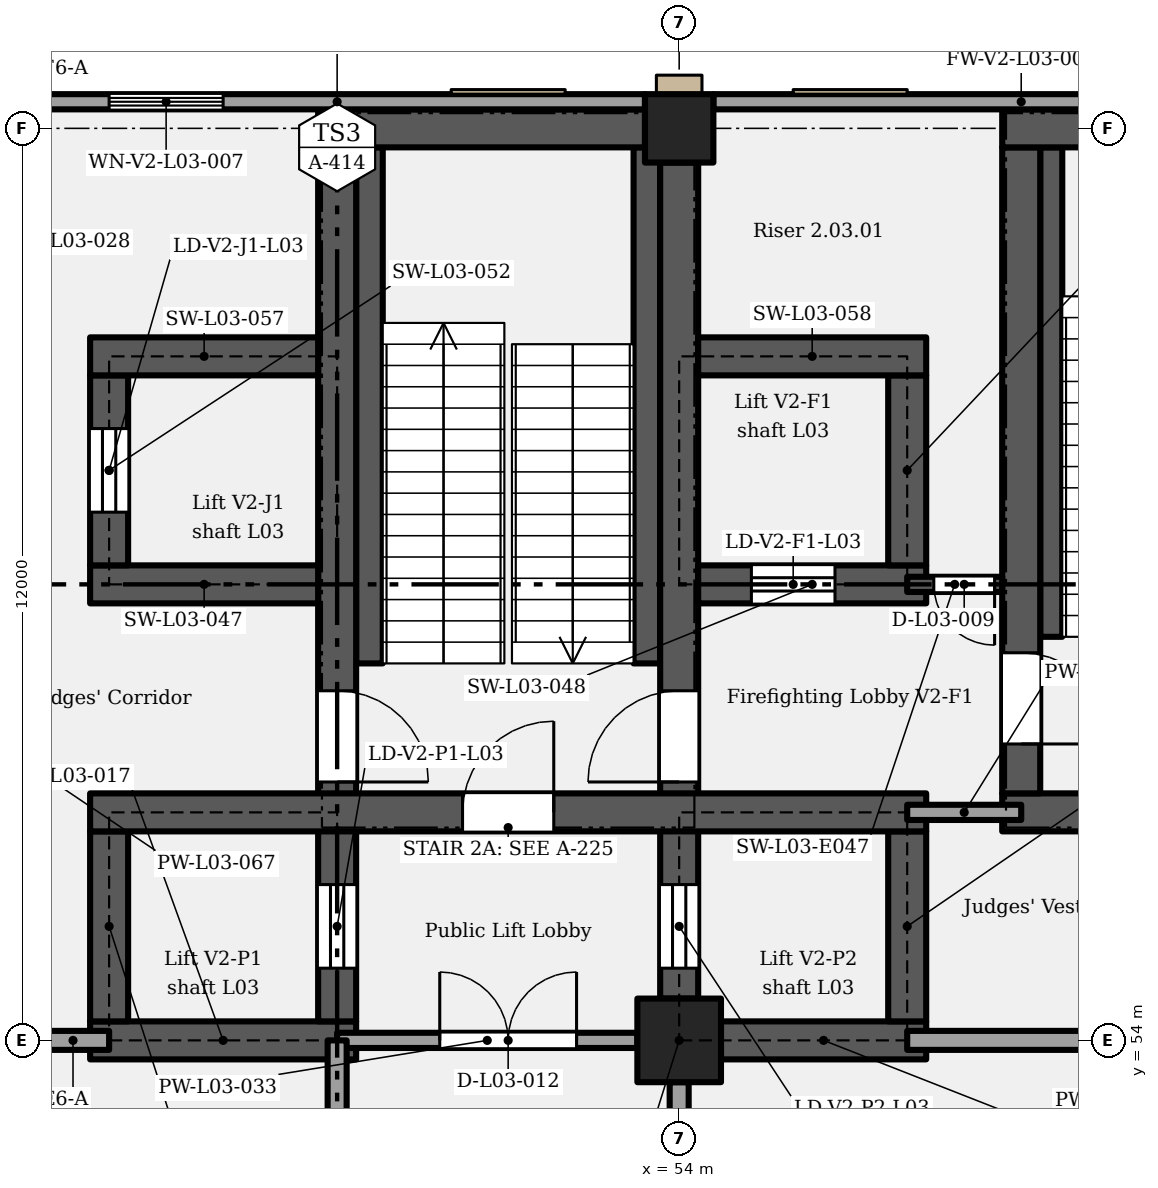
"""IFC4 building model, lengths in metres.
Left out: names, types, materials, properties, quantities, classifications, styles, units other than length and angle.
Written with IfcOpenShell. Run it as: python <this file> out.ifc"""

import sys

from ifc_helpers import new_model, si_unit, direction, frame, frame_2d, origin, origin_2d, place, context, subcontext, project, spatial, rectangle, extrude, element, fill, save


model = new_model("IFC4")
c1 = context("Model", 3, precision=1e-05, world=origin(), true_north=direction((0.0, 1.0)))
c2 = subcontext(c1, "Body", "Model", "MODEL_VIEW")
j1 = project(units=[si_unit("LENGTHUNIT", "METRE"), si_unit("PLANEANGLEUNIT", "RADIAN")], contexts=[c1])
p1 = place(None, origin())
s1 = spatial("IfcSite", under=j1, at=p1, CompositionType="ELEMENT")
p2 = place(p1, origin())
s2 = spatial("IfcBuilding", under=s1, at=p2, CompositionType="ELEMENT")
p3 = place(p2, frame((0.0, 0.0, 17.4)))
s3 = spatial("IfcBuildingStorey", under=s2, at=p3, CompositionType="ELEMENT", Elevation=17.4)
p4 = place(p3, frame((54.0, 54.0, 0.0), z_axis=(0.0, 0.0, 1.0), x_axis=(1.0, 0.0, 0.0)))
e1 = element("IfcColumn", 1, at=p4, inside=s3, PredefinedType="COLUMN", context=c2, shape_type="SweptSolid", body=[
    extrude(rectangle(XDim=1.1, YDim=1.1, at=origin_2d()), origin(), (0.0, 0.0, 1.0), 5.4),
])
p5 = place(p3, frame((54.0, 66.0, 0.0), z_axis=(0.0, 0.0, 1.0), x_axis=(1.0, 0.0, 0.0)))
e2 = element("IfcColumn", 2, at=p5, inside=s3, PredefinedType="COLUMN", context=c2, shape_type="SweptSolid", body=[
    extrude(rectangle(XDim=0.9, YDim=0.9, at=origin_2d()), origin(), (0.0, 0.0, 1.0), 5.4),
])
p6 = place(p3, frame((46.25, 54.0, 0.0), z_axis=(0.0, 0.0, 1.0), x_axis=(1.0, 0.0, 0.0)))
e3 = element("IfcWall", 3, at=p6, inside=s3, PredefinedType="SHEAR", context=c2, shape_type="SweptSolid", body=[
    extrude(rectangle(XDim=3.5, YDim=0.5, at=frame_2d((1.75, 0.0))), origin(), (0.0, 0.0, 1.0), 5.15),
])
p7 = place(p3, frame((54.55, 54.0, 0.0), z_axis=(0.0, 0.0, 1.0), x_axis=(1.0, 0.0, 0.0)))
e4 = element("IfcWall", 4, at=p7, inside=s3, PredefinedType="SHEAR", context=c2, shape_type="SweptSolid", body=[
    extrude(rectangle(XDim=2.7, YDim=0.5, at=frame_2d((1.35, 0.0))), origin(), (0.0, 0.0, 1.0), 5.15),
])
p8 = place(p3, frame((46.5, 54.25, 0.0), z_axis=(0.0, 0.0, 1.0), x_axis=(0.0, 1.0, 0.0)))
e5 = element("IfcWall", 5, at=p8, inside=s3, PredefinedType="SHEAR", context=c2, shape_type="SweptSolid", body=[
    extrude(rectangle(XDim=2.5, YDim=0.5, at=frame_2d((1.25, 0.0))), origin(), (0.0, 0.0, 1.0), 5.15),
])
p9 = place(p3, frame((49.5, 54.25, 0.0), z_axis=(0.0, 0.0, 1.0), x_axis=(0.0, 1.0, 0.0)))
e6 = element("IfcWall", 6, at=p9, inside=s3, PredefinedType="SHEAR", context=c2, shape_type="SweptSolid", body=[
    extrude(rectangle(XDim=11.5, YDim=0.5, at=frame_2d((5.75, 0.0))), origin(), (0.0, 0.0, 1.0), 5.15),
])
p10 = place(p9, frame((0.7, 0.0, 0.0)))
e7 = element("IfcOpeningElement", 7, at=p10, cuts=e6, PredefinedType="OPENING", context=c2, shape_type="SweptSolid", body=[
    extrude(rectangle(XDim=1.1, YDim=2.1, at=frame_2d((0.55, 1.05))), frame((0.0, 0.26, 0.0), z_axis=(0.0, -1.0, 0.0), x_axis=(1.0, 0.0, 0.0)), (0.0, 0.0, 1.0), 0.52),
])
p11 = place(p9, frame((4.35, 0.0, 0.0), z_axis=(0.0, 0.0, 1.0), x_axis=(-1.0, 0.0, 0.0)))
e8 = element("IfcOpeningElement", 8, at=p11, cuts=e6, PredefinedType="OPENING", context=c2, shape_type="SweptSolid", body=[
    extrude(rectangle(XDim=1.2, YDim=2.1, at=frame_2d((0.6, 1.05))), frame((0.0, 0.26, 0.0), z_axis=(0.0, -1.0, 0.0), x_axis=(1.0, 0.0, 0.0)), (0.0, 0.0, 1.0), 0.52),
])
p12 = place(p3, frame((57.0, 54.25, 0.0), z_axis=(0.0, 0.0, 1.0), x_axis=(0.0, 1.0, 0.0)))
e9 = element("IfcWall", 9, at=p12, inside=s3, PredefinedType="SHEAR", context=c2, shape_type="SweptSolid", body=[
    extrude(rectangle(XDim=2.5, YDim=0.5, at=frame_2d((1.25, 0.0))), origin(), (0.0, 0.0, 1.0), 5.15),
])
p13 = place(p3, frame((54.0, 54.55, 0.0), z_axis=(0.0, 0.0, 1.0), x_axis=(0.0, 1.0, 0.0)))
e10 = element("IfcWall", 10, at=p13, inside=s3, PredefinedType="SHEAR", context=c2, shape_type="SweptSolid", body=[
    extrude(rectangle(XDim=11.0, YDim=0.5, at=frame_2d((5.5, 0.0))), origin(), (0.0, 0.0, 1.0), 5.15),
])
p14 = place(p13, frame((0.4, 0.0, 0.0)))
e11 = element("IfcOpeningElement", 11, at=p14, cuts=e10, PredefinedType="OPENING", context=c2, shape_type="SweptSolid", body=[
    extrude(rectangle(XDim=1.1, YDim=2.1, at=frame_2d((0.55, 1.05))), frame((0.0, 0.26, 0.0), z_axis=(0.0, -1.0, 0.0), x_axis=(1.0, 0.0, 0.0)), (0.0, 0.0, 1.0), 0.52),
])
p15 = place(p13, frame((2.85, 0.0, 0.0)))
e12 = element("IfcOpeningElement", 12, at=p15, cuts=e10, PredefinedType="OPENING", context=c2, shape_type="SweptSolid", body=[
    extrude(rectangle(XDim=1.2, YDim=2.1, at=frame_2d((0.6, 1.05))), frame((0.0, 0.26, 0.0), z_axis=(0.0, -1.0, 0.0), x_axis=(1.0, 0.0, 0.0)), (0.0, 0.0, 1.0), 0.52),
])
p16 = place(p3, frame((46.25, 57.0, 0.0), z_axis=(0.0, 0.0, 1.0), x_axis=(1.0, 0.0, 0.0)))
e13 = element("IfcWall", 13, at=p16, inside=s3, PredefinedType="SHEAR", context=c2, shape_type="SweptSolid", body=[
    extrude(rectangle(XDim=11.0, YDim=0.5, at=frame_2d((5.5, 0.0))), origin(), (0.0, 0.0, 1.0), 5.15),
])
p17 = place(p16, frame((4.9, 0.0, 0.0)))
e14 = element("IfcOpeningElement", 14, at=p17, cuts=e13, PredefinedType="OPENING", context=c2, shape_type="SweptSolid", body=[
    extrude(rectangle(XDim=1.2, YDim=2.1, at=frame_2d((0.6, 1.05))), frame((0.0, 0.26, 0.0), z_axis=(0.0, -1.0, 0.0), x_axis=(1.0, 0.0, 0.0)), (0.0, 0.0, 1.0), 0.52),
])
p18 = place(p3, frame((58.25, 57.0, 0.0), z_axis=(0.0, 0.0, 1.0), x_axis=(1.0, 0.0, 0.0)))
e15 = element("IfcWall", 15, at=p18, inside=s3, PredefinedType="SHEAR", context=c2, shape_type="SweptSolid", body=[
    extrude(rectangle(XDim=5.0, YDim=0.5, at=frame_2d((2.5, 0.0))), origin(), (0.0, 0.0, 1.0), 5.15),
])
p19 = place(p18, frame((2.0, 0.0, 0.0)))
e16 = element("IfcOpeningElement", 16, at=p19, cuts=e15, PredefinedType="OPENING", context=c2, shape_type="SweptSolid", body=[
    extrude(rectangle(XDim=1.0, YDim=2.1, at=frame_2d((0.5, 1.05))), frame((0.0, 0.26, 0.0), z_axis=(0.0, -1.0, 0.0), x_axis=(1.0, 0.0, 0.0)), (0.0, 0.0, 1.0), 0.52),
])
p20 = place(p3, frame((58.5, 57.25, 0.0), z_axis=(0.0, 0.0, 1.0), x_axis=(0.0, 1.0, 0.0)))
e17 = element("IfcWall", 17, at=p20, inside=s3, PredefinedType="SHEAR", context=c2, shape_type="SweptSolid", body=[
    extrude(rectangle(XDim=8.5, YDim=0.5, at=frame_2d((4.25, 0.0))), origin(), (0.0, 0.0, 1.0), 5.15),
])
p21 = place(p20, frame((1.85, 0.0, 0.0), z_axis=(0.0, 0.0, 1.0), x_axis=(-1.0, 0.0, 0.0)))
e18 = element("IfcOpeningElement", 18, at=p21, cuts=e17, PredefinedType="OPENING", context=c2, shape_type="SweptSolid", body=[
    extrude(rectangle(XDim=1.2, YDim=2.1, at=frame_2d((0.6, 1.05))), frame((0.0, 0.26, 0.0), z_axis=(0.0, -1.0, 0.0), x_axis=(1.0, 0.0, 0.0)), (0.0, 0.0, 1.0), 0.52),
])
p22 = place(p3, frame((46.25, 60.0, 0.0), z_axis=(0.0, 0.0, 1.0), x_axis=(1.0, 0.0, 0.0)))
e19 = element("IfcWall", 19, at=p22, inside=s3, PredefinedType="SHEAR", context=c2, shape_type="SweptSolid", body=[
    extrude(rectangle(XDim=3.0, YDim=0.5, at=frame_2d((1.5, 0.0))), origin(), (0.0, 0.0, 1.0), 5.15),
])
p23 = place(p3, frame((54.25, 60.0, 0.0), z_axis=(0.0, 0.0, 1.0), x_axis=(1.0, 0.0, 0.0)))
e20 = element("IfcWall", 20, at=p23, inside=s3, PredefinedType="SHEAR", context=c2, shape_type="SweptSolid", body=[
    extrude(rectangle(XDim=3.0, YDim=0.5, at=frame_2d((1.5, 0.0))), origin(), (0.0, 0.0, 1.0), 5.15),
])
p24 = place(p23, frame((0.7, 0.0, 0.0)))
e21 = element("IfcOpeningElement", 21, at=p24, cuts=e20, PredefinedType="OPENING", context=c2, shape_type="SweptSolid", body=[
    extrude(rectangle(XDim=1.1, YDim=2.1, at=frame_2d((0.55, 1.05))), frame((0.0, 0.26, 0.0), z_axis=(0.0, -1.0, 0.0), x_axis=(1.0, 0.0, 0.0)), (0.0, 0.0, 1.0), 0.52),
])
p25 = place(p3, frame((46.5, 60.25, 0.0), z_axis=(0.0, 0.0, 1.0), x_axis=(0.0, 1.0, 0.0)))
e22 = element("IfcWall", 22, at=p25, inside=s3, PredefinedType="SHEAR", context=c2, shape_type="SweptSolid", body=[
    extrude(rectangle(XDim=2.5, YDim=0.5, at=frame_2d((1.25, 0.0))), origin(), (0.0, 0.0, 1.0), 5.15),
])
p26 = place(p25, frame((0.7, 0.0, 0.0)))
e23 = element("IfcOpeningElement", 23, at=p26, cuts=e22, PredefinedType="OPENING", context=c2, shape_type="SweptSolid", body=[
    extrude(rectangle(XDim=1.1, YDim=2.1, at=frame_2d((0.55, 1.05))), frame((0.0, 0.26, 0.0), z_axis=(0.0, -1.0, 0.0), x_axis=(1.0, 0.0, 0.0)), (0.0, 0.0, 1.0), 0.52),
])
p27 = place(p3, frame((57.0, 60.25, 0.0), z_axis=(0.0, 0.0, 1.0), x_axis=(0.0, 1.0, 0.0)))
e24 = element("IfcWall", 24, at=p27, inside=s3, PredefinedType="SHEAR", context=c2, shape_type="SweptSolid", body=[
    extrude(rectangle(XDim=2.5, YDim=0.5, at=frame_2d((1.25, 0.0))), origin(), (0.0, 0.0, 1.0), 5.15),
])
for number, where, z_axis, x_axis in (
    (25, (46.25, 63.0, 0.0), (0.0, 0.0, 1.0), (1.0, 0.0, 0.0)),
    (26, (54.25, 63.0, 0.0), (0.0, 0.0, 1.0), (1.0, 0.0, 0.0)),
):
    element("IfcWall", number, at=place(p3, frame(where, z_axis=z_axis, x_axis=x_axis)), inside=s3, PredefinedType="SHEAR", context=c2, shape_type="SweptSolid", body=[
        extrude(rectangle(XDim=3.0, YDim=0.5, at=frame_2d((1.5, 0.0))), origin(), (0.0, 0.0, 1.0), 5.15),
    ])
for number, where, z_axis, x_axis in (
    (27, (49.25, 66.0, 0.0), (0.0, 0.0, 1.0), (1.0, 0.0, 0.0)),
    (28, (58.25, 66.0, 0.0), (0.0, 0.0, 1.0), (1.0, 0.0, 0.0)),
):
    element("IfcWall", number, at=place(p3, frame(where, z_axis=z_axis, x_axis=x_axis)), inside=s3, PredefinedType="SHEAR", context=c2, shape_type="SweptSolid", body=[
        extrude(rectangle(XDim=4.3, YDim=0.5, at=frame_2d((2.15, 0.0))), origin(), (0.0, 0.0, 1.0), 5.15),
    ])
p28 = place(p3, frame((45.45, 66.35, 0.0), z_axis=(0.0, 0.0, 1.0), x_axis=(1.0, 0.0, 0.0)))
e29 = element("IfcWall", 29, at=p28, inside=s3, PredefinedType="SOLIDWALL", context=c2, shape_type="SweptSolid", body=[
    extrude(rectangle(XDim=8.1, YDim=0.2, at=frame_2d((4.05, 0.0))), origin(), (0.0, 0.0, 1.0), 5.15),
])
p29 = place(p28, frame((1.05, 0.0, 1.05)))
e30 = element("IfcOpeningElement", 30, at=p29, cuts=e29, PredefinedType="OPENING", context=c2, shape_type="SweptSolid", body=[
    extrude(rectangle(XDim=1.5, YDim=3.5, at=frame_2d((0.75, 1.75))), frame((0.0, 0.11, 0.0), z_axis=(0.0, -1.0, 0.0), x_axis=(1.0, 0.0, 0.0)), (0.0, 0.0, 1.0), 0.22),
])
p30 = place(p3, frame((54.45, 66.35, 0.0), z_axis=(0.0, 0.0, 1.0), x_axis=(1.0, 0.0, 0.0)))
e31 = element("IfcWall", 31, at=p30, inside=s3, PredefinedType="SOLIDWALL", context=c2, shape_type="SweptSolid", body=[
    extrude(rectangle(XDim=8.1, YDim=0.2, at=frame_2d((4.05, 0.0))), origin(), (0.0, 0.0, 1.0), 5.15),
])
p31 = place(p3, frame((45.55, 54.0, 0.0), z_axis=(0.0, 0.0, 1.0), x_axis=(1.0, 0.0, 0.0)))
e32 = element("IfcWall", 32, at=p31, inside=s3, PredefinedType="PARTITIONING", context=c2, shape_type="SweptSolid", body=[
    extrude(rectangle(XDim=0.95, YDim=0.25, at=frame_2d((0.475, 0.0))), origin(), (0.0, 0.0, 1.0), 4.4),
])
p32 = place(p3, frame((49.5, 54.0, 0.0), z_axis=(0.0, 0.0, 1.0), x_axis=(1.0, 0.0, 0.0)))
e33 = element("IfcWall", 33, at=p32, inside=s3, PredefinedType="PARTITIONING", context=c2, shape_type="SweptSolid", body=[
    extrude(rectangle(XDim=3.95, YDim=0.2, at=frame_2d((1.975, 0.0))), origin(), (0.0, 0.0, 1.0), 4.4),
])
p33 = place(p32, frame((1.35, 0.0, 0.0)))
e34 = element("IfcOpeningElement", 34, at=p33, cuts=e33, PredefinedType="OPENING", context=c2, shape_type="SweptSolid", body=[
    extrude(rectangle(XDim=1.8, YDim=2.1, at=frame_2d((0.9, 1.05))), frame((0.0, 0.11, 0.0), z_axis=(0.0, -1.0, 0.0), x_axis=(1.0, 0.0, 0.0)), (0.0, 0.0, 1.0), 0.22),
])
p34 = place(p3, frame((57.0, 54.0, 0.0), z_axis=(0.0, 0.0, 1.0), x_axis=(1.0, 0.0, 0.0)))
e35 = element("IfcWall", 35, at=p34, inside=s3, PredefinedType="PARTITIONING", context=c2, shape_type="SweptSolid", body=[
    extrude(rectangle(XDim=5.45, YDim=0.25, at=frame_2d((2.725, 0.0))), origin(), (0.0, 0.0, 1.0), 4.4),
])
p35 = place(p34, frame((2.5, 0.0, 0.0)))
e36 = element("IfcOpeningElement", 36, at=p35, cuts=e35, PredefinedType="OPENING", context=c2, shape_type="SweptSolid", body=[
    extrude(rectangle(XDim=1.0, YDim=2.1, at=frame_2d((0.5, 1.05))), frame((0.0, 0.135, 0.0), z_axis=(0.0, -1.0, 0.0), x_axis=(1.0, 0.0, 0.0)), (0.0, 0.0, 1.0), 0.27),
])
p36 = place(p3, frame((57.0, 57.0, 0.0), z_axis=(0.0, 0.0, 1.0), x_axis=(1.0, 0.0, 0.0)))
e37 = element("IfcWall", 37, at=p36, inside=s3, PredefinedType="PARTITIONING", context=c2, shape_type="SweptSolid", body=[
    extrude(rectangle(XDim=1.5, YDim=0.2, at=frame_2d((0.75, 0.0))), origin(), (0.0, 0.0, 1.0), 5.15),
])
p37 = place(p3, frame((57.0, 60.0, 0.0), z_axis=(0.0, 0.0, 1.0), x_axis=(1.0, 0.0, 0.0)))
e38 = element("IfcWall", 38, at=p37, inside=s3, PredefinedType="SHEAR", context=c2, shape_type="SweptSolid", body=[
    extrude(rectangle(XDim=1.25, YDim=0.2, at=frame_2d((0.625, 0.0))), origin(), (0.0, 0.0, 1.0), 5.15),
])
p38 = place(p37, frame((1.15, 0.0, 0.0), z_axis=(0.0, 0.0, 1.0), x_axis=(-1.0, 0.0, 0.0)))
e39 = element("IfcOpeningElement", 39, at=p38, cuts=e38, PredefinedType="OPENING", context=c2, shape_type="SweptSolid", body=[
    extrude(rectangle(XDim=0.8, YDim=2.0, at=frame_2d((0.4, 1.0))), frame((0.0, 0.11, 0.0), z_axis=(0.0, -1.0, 0.0), x_axis=(1.0, 0.0, 0.0)), (0.0, 0.0, 1.0), 0.22),
])
p39 = place(p3, frame((49.5, 43.5, 0.0), z_axis=(0.0, 0.0, 1.0), x_axis=(0.0, 1.0, 0.0)))
e40 = element("IfcWall", 40, at=p39, inside=s3, PredefinedType="PARTITIONING", context=c2, shape_type="SweptSolid", body=[
    extrude(rectangle(XDim=10.5, YDim=0.25, at=frame_2d((5.25, 0.0))), origin(), (0.0, 0.0, 1.0), 5.15),
])
p40 = place(p39, frame((0.6, 0.0, 0.0)))
e41 = element("IfcOpeningElement", 41, at=p40, cuts=e40, PredefinedType="OPENING", context=c2, shape_type="SweptSolid", body=[
    extrude(rectangle(XDim=1.8, YDim=2.4, at=frame_2d((0.9, 1.2))), frame((0.0, 0.135, 0.0), z_axis=(0.0, -1.0, 0.0), x_axis=(1.0, 0.0, 0.0)), (0.0, 0.0, 1.0), 0.27),
])
p41 = place(p39, frame((7.1, 0.0, 0.0)))
e42 = element("IfcOpeningElement", 42, at=p41, cuts=e40, PredefinedType="OPENING", context=c2, shape_type="SweptSolid", body=[
    extrude(rectangle(XDim=1.8, YDim=2.4, at=frame_2d((0.9, 1.2))), frame((0.0, 0.135, 0.0), z_axis=(0.0, -1.0, 0.0), x_axis=(1.0, 0.0, 0.0)), (0.0, 0.0, 1.0), 0.27),
])
p42 = place(p3, frame((54.0, 38.05, 0.0), z_axis=(0.0, 0.0, 1.0), x_axis=(0.0, 1.0, 0.0)))
e43 = element("IfcWall", 43, at=p42, inside=s3, PredefinedType="PARTITIONING", context=c2, shape_type="SweptSolid", body=[
    extrude(rectangle(XDim=15.4, YDim=0.25, at=frame_2d((7.7, 0.0))), origin(), (0.0, 0.0, 1.0), 4.2),
])
p43 = place(p42, frame((1.55, 0.0, 0.0)))
e44 = element("IfcOpeningElement", 44, at=p43, cuts=e43, PredefinedType="OPENING", context=c2, shape_type="SweptSolid", body=[
    extrude(rectangle(XDim=1.8, YDim=2.4, at=frame_2d((0.9, 1.2))), frame((0.0, 0.135, 0.0), z_axis=(0.0, -1.0, 0.0), x_axis=(1.0, 0.0, 0.0)), (0.0, 0.0, 1.0), 0.27),
])
p44 = place(p42, frame((12.55, 0.0, 0.0)))
e45 = element("IfcOpeningElement", 45, at=p44, cuts=e43, PredefinedType="OPENING", context=c2, shape_type="SweptSolid", body=[
    extrude(rectangle(XDim=1.8, YDim=2.4, at=frame_2d((0.9, 1.2))), frame((0.0, 0.135, 0.0), z_axis=(0.0, -1.0, 0.0), x_axis=(1.0, 0.0, 0.0)), (0.0, 0.0, 1.0), 0.27),
])
p45 = place(p3, frame((49.925, 58.96, 0.0), z_axis=(0.0, 0.0, 1.0), x_axis=(0.0, 1.0, 0.0)))
e46 = element("IfcWall", 46, at=p45, inside=s3, PredefinedType="SHEAR", context=c2, shape_type="SweptSolid", body=[
    extrude(rectangle(XDim=6.79, YDim=0.35, at=frame_2d((3.395, 0.0))), origin(), (0.0, 0.0, 1.0), 2.587),
])
p46 = place(p3, frame((53.575, 58.96, 0.0), z_axis=(0.0, 0.0, 1.0), x_axis=(0.0, 1.0, 0.0)))
e47 = element("IfcWall", 47, at=p46, inside=s3, PredefinedType="SHEAR", context=c2, shape_type="SweptSolid", body=[
    extrude(rectangle(XDim=6.79, YDim=0.35, at=frame_2d((3.395, 0.0))), origin(), (0.0, 0.0, 1.0), 5.15),
])
p47 = place(p3, frame((58.895, 59.31, 0.0), z_axis=(0.0, 0.0, 1.0), x_axis=(0.0, 1.0, 0.0)))
e48 = element("IfcWall", 48, at=p47, inside=s3, PredefinedType="SHEAR", context=c2, shape_type="SweptSolid", body=[
    extrude(rectangle(XDim=6.44, YDim=0.29, at=frame_2d((3.22, 0.0))), origin(), (0.0, 0.0, 1.0), 2.587),
])
p48 = place(p29, origin())
e49 = element("IfcWindow", 49, at=p48, inside=s3, PartitioningType="SINGLE_PANEL", PredefinedType="WINDOW", context=c2, shape_type="SweptSolid", body=[
    extrude(rectangle(XDim=1.5, YDim=3.5, at=frame_2d((0.75, 1.75))), frame((0.0, 0.03, 0.0), z_axis=(0.0, -1.0, 0.0), x_axis=(1.0, 0.0, 0.0)), (0.0, 0.0, 1.0), 0.06),
])
fill(e30, e49)
p49 = place(p10, origin())
e50 = element("IfcDoor", 50, at=p49, inside=s3, OperationType="SLIDING_TO_LEFT", PredefinedType="DOOR", context=c2, shape_type="SweptSolid", body=[
    extrude(rectangle(XDim=1.1, YDim=2.1, at=frame_2d((0.55, 1.05))), frame((0.0, 0.025, 0.0), z_axis=(0.0, -1.0, 0.0), x_axis=(1.0, 0.0, 0.0)), (0.0, 0.0, 1.0), 0.05),
])
fill(e7, e50)
p50 = place(p14, origin())
e51 = element("IfcDoor", 51, at=p50, inside=s3, OperationType="SLIDING_TO_LEFT", PredefinedType="DOOR", context=c2, shape_type="SweptSolid", body=[
    extrude(rectangle(XDim=1.1, YDim=2.1, at=frame_2d((0.55, 1.05))), frame((0.0, 0.025, 0.0), z_axis=(0.0, -1.0, 0.0), x_axis=(1.0, 0.0, 0.0)), (0.0, 0.0, 1.0), 0.05),
])
fill(e11, e51)
p51 = place(p17, origin())
e52 = element("IfcDoor", 52, at=p51, inside=s3, OperationType="SINGLE_SWING_RIGHT", PredefinedType="DOOR", context=c2, shape_type="SweptSolid", body=[
    extrude(rectangle(XDim=1.2, YDim=2.1, at=frame_2d((0.6, 1.05))), frame((0.0, 0.025, 0.0), z_axis=(0.0, -1.0, 0.0), x_axis=(1.0, 0.0, 0.0)), (0.0, 0.0, 1.0), 0.05),
])
fill(e14, e52)
p52 = place(p24, origin())
e53 = element("IfcDoor", 53, at=p52, inside=s3, OperationType="SLIDING_TO_LEFT", PredefinedType="DOOR", context=c2, shape_type="SweptSolid", body=[
    extrude(rectangle(XDim=1.1, YDim=2.1, at=frame_2d((0.55, 1.05))), frame((0.0, 0.025, 0.0), z_axis=(0.0, -1.0, 0.0), x_axis=(1.0, 0.0, 0.0)), (0.0, 0.0, 1.0), 0.05),
])
fill(e21, e53)
p53 = place(p15, origin())
e54 = element("IfcDoor", 54, at=p53, inside=s3, OperationType="SINGLE_SWING_LEFT", PredefinedType="DOOR", context=c2, shape_type="SweptSolid", body=[
    extrude(rectangle(XDim=1.2, YDim=2.1, at=frame_2d((0.6, 1.05))), frame((0.0, 0.025, 0.0), z_axis=(0.0, -1.0, 0.0), x_axis=(1.0, 0.0, 0.0)), (0.0, 0.0, 1.0), 0.05),
])
fill(e12, e54)
p54 = place(p21, origin())
e55 = element("IfcDoor", 55, at=p54, inside=s3, OperationType="SINGLE_SWING_RIGHT", PredefinedType="DOOR", context=c2, shape_type="SweptSolid", body=[
    extrude(rectangle(XDim=1.2, YDim=2.1, at=frame_2d((0.6, 1.05))), frame((0.0, 0.025, 0.0), z_axis=(0.0, -1.0, 0.0), x_axis=(1.0, 0.0, 0.0)), (0.0, 0.0, 1.0), 0.05),
])
fill(e18, e55)
p55 = place(p38, origin())
e56 = element("IfcDoor", 56, at=p55, inside=s3, OperationType="SINGLE_SWING_LEFT", PredefinedType="DOOR", context=c2, shape_type="SweptSolid", body=[
    extrude(rectangle(XDim=0.8, YDim=2.0, at=frame_2d((0.4, 1.0))), frame((0.0, 0.025, 0.0), z_axis=(0.0, -1.0, 0.0), x_axis=(1.0, 0.0, 0.0)), (0.0, 0.0, 1.0), 0.05),
])
fill(e39, e56)
p56 = place(p26, origin())
e57 = element("IfcDoor", 57, at=p56, inside=s3, OperationType="SLIDING_TO_LEFT", PredefinedType="DOOR", context=c2, shape_type="SweptSolid", body=[
    extrude(rectangle(XDim=1.1, YDim=2.1, at=frame_2d((0.55, 1.05))), frame((0.0, 0.025, 0.0), z_axis=(0.0, -1.0, 0.0), x_axis=(1.0, 0.0, 0.0)), (0.0, 0.0, 1.0), 0.05),
])
fill(e23, e57)
p57 = place(p11, origin())
e58 = element("IfcDoor", 58, at=p57, inside=s3, OperationType="SINGLE_SWING_RIGHT", PredefinedType="DOOR", context=c2, shape_type="SweptSolid", body=[
    extrude(rectangle(XDim=1.2, YDim=2.1, at=frame_2d((0.6, 1.05))), frame((0.0, 0.025, 0.0), z_axis=(0.0, -1.0, 0.0), x_axis=(1.0, 0.0, 0.0)), (0.0, 0.0, 1.0), 0.05),
])
fill(e8, e58)
p58 = place(p33, origin())
e59 = element("IfcDoor", 59, at=p58, inside=s3, OperationType="DOUBLE_DOOR_SINGLE_SWING", PredefinedType="DOOR", context=c2, shape_type="SweptSolid", body=[
    extrude(rectangle(XDim=1.8, YDim=2.1, at=frame_2d((0.9, 1.05))), frame((0.0, 0.025, 0.0), z_axis=(0.0, -1.0, 0.0), x_axis=(1.0, 0.0, 0.0)), (0.0, 0.0, 1.0), 0.05),
])
fill(e34, e59)
save(model, sys.argv[1])
